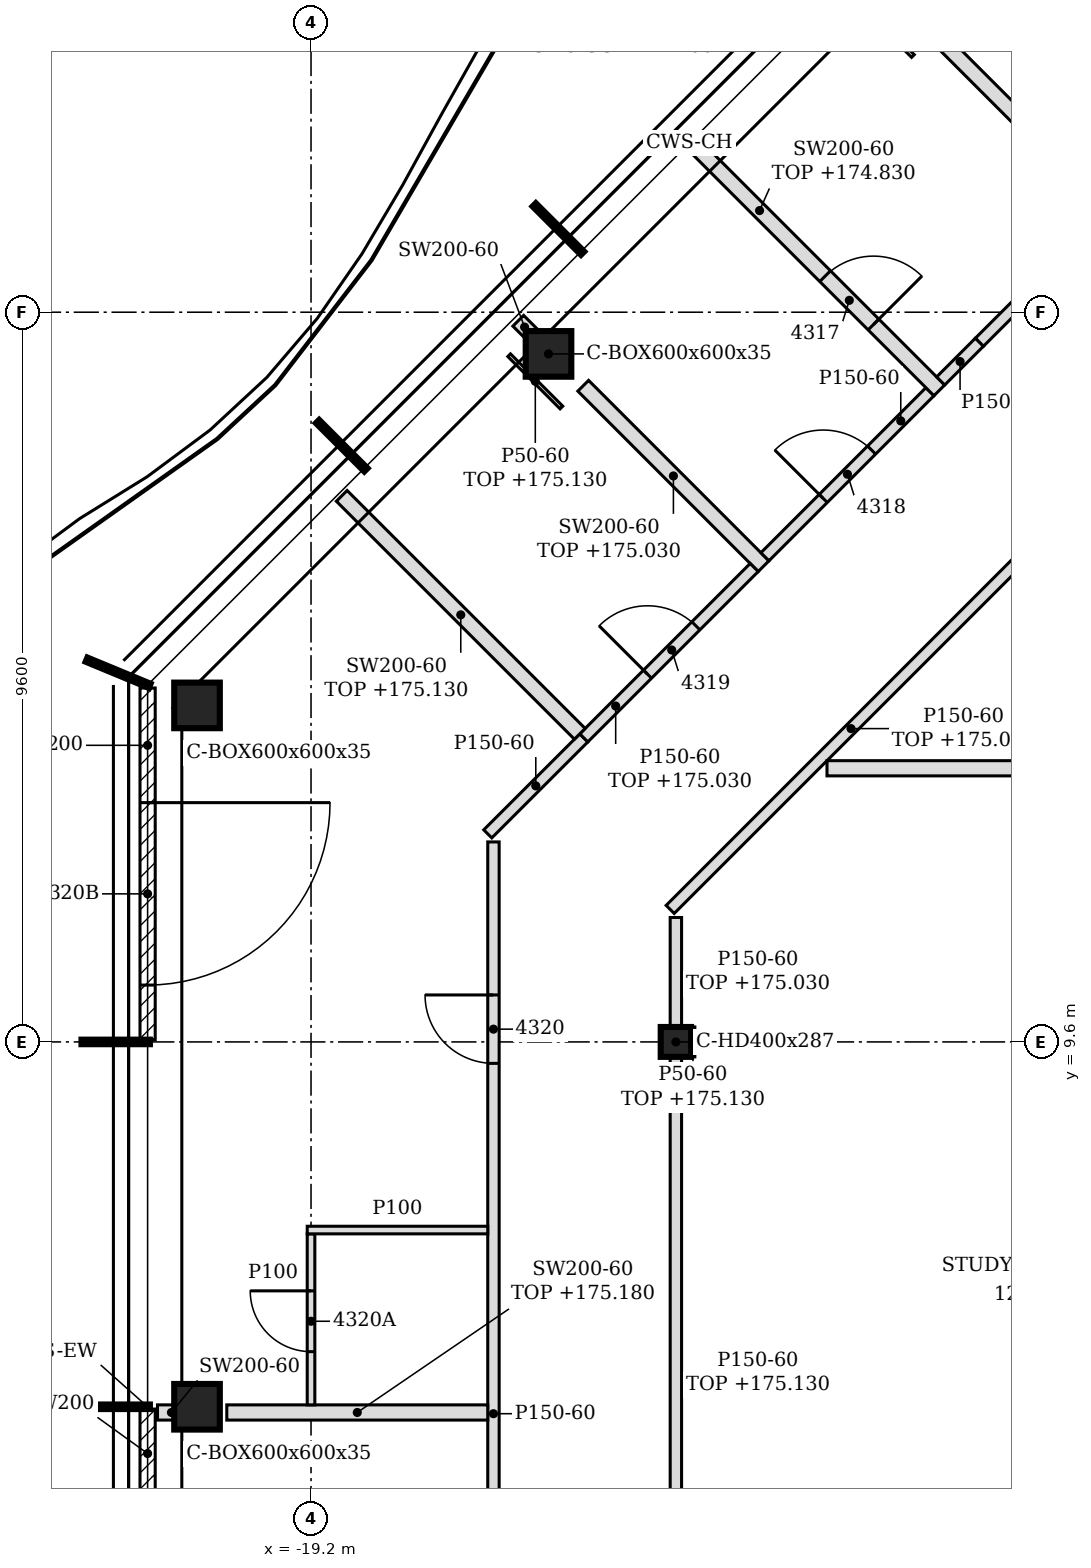
"""IFC4 building model, lengths in metres.
Left out: names, types, materials, properties, quantities, classifications, styles, units other than length and angle.
Written with IfcOpenShell. Run it as: python <this file> out.ifc"""

import sys

from ifc_helpers import new_model, si_unit, direction, frame, frame_2d, origin, origin_2d, place, context, subcontext, project, spatial, polyline, rectangle, hollow_rectangle, i_section, outline, extrude, clip, halfspace, element, fill, save


model = new_model("IFC4")
c1 = context("Model", 3, precision=1e-05, world=origin(), true_north=direction((0.0, 1.0)))
c2 = subcontext(c1, "Body", "Model", "MODEL_VIEW")
j1 = project(units=[si_unit("LENGTHUNIT", "METRE"), si_unit("PLANEANGLEUNIT", "RADIAN")], contexts=[c1])
p1 = place(None, origin())
s1 = spatial("IfcSite", under=j1, at=p1, CompositionType="ELEMENT")
p2 = place(p1, origin())
s2 = spatial("IfcBuilding", under=s1, at=p2, CompositionType="ELEMENT")
p3 = place(p2, frame((0.0, 0.0, 172.2)))
s3 = spatial("IfcBuildingStorey", under=s2, at=p3, CompositionType="ELEMENT", Elevation=172.2)
p4 = place(p3, frame((-16.076, 18.652, -0.15), z_axis=(0.062353782033, -0.041591730966, 0.997187110718), x_axis=(0.554908399644, 0.831911454426, 0.0)))
e1 = element("IfcColumn", 1, at=p4, inside=s3, PredefinedType="COLUMN", context=c2, shape_type="Clipping", body=[
    clip(clip(extrude(hollow_rectangle(XDim=0.6, YDim=0.6, WallThickness=0.035, at=origin_2d()), origin(), (0.0, 0.0, 1.0), 3.61), halfspace(frame((0.0, 0.0, 0.011), z_axis=(0.0, 0.0, 1.0), x_axis=(1.0, 0.0, 0.0)), True)), halfspace(frame((0.0, 0.0, 3.588), z_axis=(0.0, 0.0, 1.0), x_axis=(1.0, 0.0, 0.0)), False)),
])
p5 = place(p3, frame((-20.7, 14.027, -0.15), z_axis=(0.062286590776, -0.041524393851, 0.99719411617), x_axis=(0.554700196225, 0.832050294338, 0.0)))
e2 = element("IfcColumn", 2, at=p5, inside=s3, PredefinedType="COLUMN", context=c2, shape_type="Clipping", body=[
    clip(clip(extrude(hollow_rectangle(XDim=0.6, YDim=0.6, WallThickness=0.035, at=origin_2d()), origin(), (0.0, 0.0, 1.0), 3.61), halfspace(frame((0.0, 0.0, 0.011), z_axis=(0.0, 0.0, 1.0), x_axis=(1.0, 0.0, 0.0)), True)), halfspace(frame((0.0, 0.0, 3.588), z_axis=(0.0, 0.0, 1.0), x_axis=(1.0, 0.0, 0.0)), False)),
])
p6 = place(p3, frame((-20.7, 4.8, -0.15), z_axis=(0.062286415717, -0.041591906261, 0.997191313515), x_axis=(0.555325171193, 0.831633305153, 0.0)))
e3 = element("IfcColumn", 3, at=p6, inside=s3, PredefinedType="COLUMN", context=c2, shape_type="Clipping", body=[
    clip(clip(extrude(hollow_rectangle(XDim=0.6, YDim=0.6, WallThickness=0.035, at=origin_2d()), origin(), (0.0, 0.0, 1.0), 3.61), halfspace(frame((0.0, 0.0, 0.011), z_axis=(0.0, 0.0, 1.0), x_axis=(1.0, 0.0, 0.0)), True)), halfspace(frame((0.0, 0.0, 3.588), z_axis=(0.0, 0.0, 1.0), x_axis=(1.0, 0.0, 0.0)), False)),
])
p7 = place(p3, frame((-14.4, 9.6, -0.15), z_axis=(0.0, 0.0, 1.0), x_axis=(1.0, 0.0, 0.0)))
e4 = element("IfcColumn", 4, at=p7, inside=s3, PredefinedType="COLUMN", context=c2, shape_type="SweptSolid", body=[
    extrude(i_section(OverallWidth=0.399, OverallDepth=0.393, WebThickness=0.023, FlangeThickness=0.037, FilletRadius=0.015, at=origin_2d()), origin(), (0.0, 0.0, 1.0), 3.6),
])
p8 = place(p3, frame((-21.35, 14.256, 0.0), z_axis=(0.0, 0.0, 1.0), x_axis=(0.0, -1.0, 0.0)))
e5 = element("IfcWall", 5, at=p8, inside=s3, PredefinedType="NOTDEFINED", context=c2, shape_type="SweptSolid", body=[
    extrude(rectangle(XDim=4.626, YDim=0.2, at=frame_2d((2.313, 0.0))), origin(), (0.0, 0.0, 1.0), 3.45),
])
p9 = place(p8, frame((1.509, 0.0, 0.0)))
e6 = element("IfcOpeningElement", 6, at=p9, cuts=e5, PredefinedType="OPENING", context=c2, shape_type="SweptSolid", body=[
    extrude(rectangle(XDim=2.4, YDim=2.4, at=frame_2d((1.2, 1.2))), frame((0.0, 0.11, 0.0), z_axis=(0.0, -1.0, 0.0), x_axis=(1.0, 0.0, 0.0)), (0.0, 0.0, 1.0), 0.22),
])
p10 = place(p3, frame((-21.35, 4.77, 0.0), z_axis=(0.0, 0.0, 1.0), x_axis=(0.0, -1.0, 0.0)))
e7 = element("IfcWall", 7, at=p10, inside=s3, PredefinedType="NOTDEFINED", context=c2, shape_type="SweptSolid", body=[
    extrude(rectangle(XDim=4.74, YDim=0.2, at=frame_2d((2.37, 0.0))), origin(), (0.0, 0.0, 1.0), 3.45),
])
p11 = place(p10, frame((1.17, 0.0, 0.0)))
e8 = element("IfcOpeningElement", 8, at=p11, cuts=e7, PredefinedType="OPENING", context=c2, shape_type="SweptSolid", body=[
    extrude(rectangle(XDim=2.4, YDim=2.4, at=frame_2d((1.2, 1.2))), frame((0.0, 0.11, 0.0), z_axis=(0.0, -1.0, 0.0), x_axis=(1.0, 0.0, 0.0)), (0.0, 0.0, 1.0), 0.22),
])
p12 = place(p3, frame((-16.8, 0.1, 0.0), z_axis=(0.0, 0.0, 1.0), x_axis=(0.0, 1.0, 0.0)))
e9 = element("IfcWall", 9, at=p12, inside=s3, PredefinedType="PARTITIONING", context=c2, shape_type="SweptSolid", body=[
    extrude(outline(polyline([(0.0, 0.0), (12.131, 0.0), (12.131, 3.45), (9.445, 3.45), (9.443, 2.98), (9.255, 2.98), (9.253, 3.45), (4.645, 3.45), (4.643, 2.98), (4.455, 2.98), (4.453, 3.45), (0.0, 3.45), (0.0, 0.0)])), frame((0.0, 0.075, 0.0), z_axis=(0.0, -1.0, 0.0), x_axis=(1.0, 0.0, 0.0)), (0.0, 0.0, 1.0), 0.15),
])
p13 = place(p12, frame((9.218, 0.0, 0.0)))
e10 = element("IfcOpeningElement", 10, at=p13, cuts=e9, PredefinedType="OPENING", context=c2, shape_type="SweptSolid", body=[
    extrude(rectangle(XDim=0.9, YDim=2.1, at=frame_2d((0.45, 1.05))), frame((0.0, 0.085, 0.0), z_axis=(0.0, -1.0, 0.0), x_axis=(1.0, 0.0, 0.0)), (0.0, 0.0, 1.0), 0.17),
])
p14 = place(p3, frame((-14.4, 1.094, 0.0), z_axis=(0.0, 0.0, 1.0), x_axis=(0.0, 1.0, 0.0)))
e11 = element("IfcWall", 11, at=p14, inside=s3, PredefinedType="PARTITIONING", context=c2, shape_type="SweptSolid", body=[
    extrude(rectangle(XDim=8.31, YDim=0.15, at=frame_2d((4.155, 0.0))), origin(), (0.0, 0.0, 1.0), 2.93),
])
p15 = place(p3, frame((-21.22, 4.725, 0.0), z_axis=(0.0, 0.0, 1.0), x_axis=(1.0, 0.0, 0.0)))
e12 = element("IfcWall", 12, at=p15, inside=s3, PredefinedType="PARTITIONING", context=c2, shape_type="SweptSolid", body=[
    extrude(outline(polyline([(0.0, 0.0), (0.113, 0.0), (0.167, 0.863), (0.22, 1.725), (0.289, 2.588), (0.367, 3.45), (0.0, 3.45), (0.0, 2.588), (0.0, 1.725), (0.0, 0.863), (0.0, 0.0)])), frame((0.0, 0.1, 0.0), z_axis=(0.0, -1.0, 0.0), x_axis=(1.0, 0.0, 0.0)), (0.0, 0.0, 1.0), 0.2),
])
p16 = place(p3, frame((-20.308, 4.725, 0.0), z_axis=(0.0, 0.0, 1.0), x_axis=(1.0, 0.0, 0.0)))
e13 = element("IfcWall", 13, at=p16, inside=s3, PredefinedType="PARTITIONING", context=c2, shape_type="SweptSolid", body=[
    extrude(outline(polyline([(0.0, 0.0), (3.433, 0.0), (3.433, 0.863), (3.433, 1.725), (3.433, 2.588), (3.433, 2.98), (0.221, 2.98), (0.196, 2.588), (0.142, 1.725), (0.078, 0.863), (0.0, 0.0)])), frame((0.0, 0.1, 0.0), z_axis=(0.0, -1.0, 0.0), x_axis=(1.0, 0.0, 0.0)), (0.0, 0.0, 1.0), 0.2),
])
p17 = place(p3, frame((-19.2, 4.825, 0.0), z_axis=(0.0, 0.0, 1.0), x_axis=(0.0, 1.0, 0.0)))
e14 = element("IfcWall", 14, at=p17, inside=s3, PredefinedType="PARTITIONING", context=c2, shape_type="SweptSolid", body=[
    extrude(rectangle(XDim=2.25, YDim=0.1, at=frame_2d((1.125, 0.0))), origin(), (0.0, 0.0, 1.0), 3.45),
])
p18 = place(p17, frame((0.7, 0.0, 0.0)))
e15 = element("IfcOpeningElement", 15, at=p18, cuts=e14, PredefinedType="OPENING", context=c2, shape_type="SweptSolid", body=[
    extrude(rectangle(XDim=0.8, YDim=2.1, at=frame_2d((0.4, 1.05))), frame((0.0, 0.06, 0.0), z_axis=(0.0, -1.0, 0.0), x_axis=(1.0, 0.0, 0.0)), (0.0, 0.0, 1.0), 0.12),
])
p19 = place(p3, frame((-19.25, 7.125, 0.0), z_axis=(0.0, 0.0, 1.0), x_axis=(1.0, 0.0, 0.0)))
e16 = element("IfcWall", 16, at=p19, inside=s3, PredefinedType="PARTITIONING", context=c2, shape_type="SweptSolid", body=[
    extrude(rectangle(XDim=2.375, YDim=0.1, at=frame_2d((1.188, 0.0))), origin(), (0.0, 0.0, 1.0), 3.45),
])
p20 = place(p3, frame((-14.4, 9.796, 0.0), z_axis=(0.0, 0.0, 1.0), x_axis=(0.0, 1.0, 0.0)))
e17 = element("IfcWall", 17, at=p20, inside=s3, PredefinedType="PARTITIONING", context=c2, shape_type="SweptSolid", body=[
    extrude(rectangle(XDim=1.44, YDim=0.15, at=frame_2d((0.72, 0.0))), origin(), (0.0, 0.0, 1.0), 2.83),
])
p21 = place(p3, frame((-14.475, 11.343, 0.0), z_axis=(0.0, 0.0, 1.0), x_axis=(0.707124921665, 0.707088640243, 0.0)))
e18 = element("IfcWall", 18, at=p21, inside=s3, PredefinedType="PARTITIONING", context=c2, shape_type="SweptSolid", body=[
    extrude(rectangle(XDim=6.729, YDim=0.15, at=frame_2d((3.365, 0.0))), origin(), (0.0, 0.0, 1.0), 2.83),
])
p22 = place(p3, frame((-16.875, 12.337, 0.0), z_axis=(0.0, 0.0, 1.0), x_axis=(0.707380006342, 0.706833450417, 0.0)))
e19 = element("IfcWall", 19, at=p22, inside=s3, PredefinedType="PARTITIONING", context=c2, shape_type="SweptSolid", body=[
    extrude(rectangle(XDim=1.787, YDim=0.15, at=frame_2d((0.894, 0.0))), origin(), (0.0, 0.0, 1.0), 3.45),
])
p23 = place(p3, frame((-12.412, 13.2, 0.0), z_axis=(0.0, 0.0, 1.0), x_axis=(1.0, 0.0, 0.0)))
e20 = element("IfcWall", 20, at=p23, inside=s3, PredefinedType="PARTITIONING", context=c2, shape_type="SweptSolid", body=[
    extrude(rectangle(XDim=5.285, YDim=0.2, at=frame_2d((2.643, 0.0))), origin(), (0.0, 0.0, 1.0), 3.45),
])
p24 = place(p3, frame((-15.611, 13.6, 0.0), z_axis=(0.0, 0.0, 1.0), x_axis=(0.707145291481, 0.707068268794, 0.0)))
e21 = element("IfcWall", 21, at=p24, inside=s3, PredefinedType="PARTITIONING", context=c2, shape_type="SweptSolid", body=[
    extrude(rectangle(XDim=3.17, YDim=0.15, at=frame_2d((1.585, 0.0))), origin(), (0.0, 0.0, 1.0), 2.83),
])
p25 = place(p24, frame((1.185, 0.0, 0.0)))
e22 = element("IfcOpeningElement", 22, at=p25, cuts=e21, PredefinedType="OPENING", context=c2, shape_type="SweptSolid", body=[
    extrude(rectangle(XDim=0.9, YDim=2.1, at=frame_2d((0.45, 1.05))), frame((0.0, 0.085, 0.0), z_axis=(0.0, -1.0, 0.0), x_axis=(1.0, 0.0, 0.0)), (0.0, 0.0, 1.0), 0.17),
])
p26 = place(p3, frame((-15.664, 13.653, 0.0), z_axis=(0.0, 0.0, 1.0), x_axis=(-0.707217034054, 0.706996511125, 0.0)))
e23 = element("IfcWall", 23, at=p26, inside=s3, PredefinedType="PARTITIONING", context=c2, shape_type="SweptSolid", body=[
    extrude(rectangle(XDim=4.428, YDim=0.2, at=frame_2d((2.214, 0.0))), origin(), (0.0, 0.0, 1.0), 2.93),
])
p27 = place(p3, frame((-13.246, 15.859, 0.0), z_axis=(0.0, 0.0, 1.0), x_axis=(-0.706961285969, 0.707252246473, 0.0)))
e24 = element("IfcWall", 24, at=p27, inside=s3, PredefinedType="PARTITIONING", context=c2, shape_type="SweptSolid", body=[
    extrude(rectangle(XDim=3.356, YDim=0.2, at=frame_2d((1.678, 0.0))), origin(), (0.0, 0.0, 1.0), 2.83),
])
p28 = place(p3, frame((-13.228, 15.983, 0.0), z_axis=(0.0, 0.0, 1.0), x_axis=(0.706947737832, 0.707265788777, 0.0)))
e25 = element("IfcWall", 25, at=p28, inside=s3, PredefinedType="PARTITIONING", context=c2, shape_type="SweptSolid", body=[
    extrude(rectangle(XDim=3.071, YDim=0.15, at=frame_2d((1.535, 0.0))), origin(), (0.0, 0.0, 1.0), 3.45),
])
p29 = place(p28, frame((1.085, 0.0, 0.0)))
e26 = element("IfcOpeningElement", 26, at=p29, cuts=e25, PredefinedType="OPENING", context=c2, shape_type="SweptSolid", body=[
    extrude(rectangle(XDim=0.9, YDim=2.1, at=frame_2d((0.45, 1.05))), frame((0.0, 0.085, 0.0), z_axis=(0.0, -1.0, 0.0), x_axis=(1.0, 0.0, 0.0)), (0.0, 0.0, 1.0), 0.17),
])
p30 = place(p3, frame((-10.934, 18.172, 0.0), z_axis=(0.0, 0.0, 1.0), x_axis=(-0.707106781187, 0.707106781187, 0.0)))
e27 = element("IfcWall", 27, at=p30, inside=s3, PredefinedType="PARTITIONING", context=c2, shape_type="SweptSolid", body=[
    extrude(rectangle(XDim=4.565, YDim=0.2, at=frame_2d((2.282, 0.0))), origin(), (0.0, 0.0, 1.0), 2.63),
])
p31 = place(p30, frame((1.225, 0.0, 0.0)))
e28 = element("IfcOpeningElement", 28, at=p31, cuts=e27, PredefinedType="OPENING", context=c2, shape_type="SweptSolid", body=[
    extrude(rectangle(XDim=0.9, YDim=2.1, at=frame_2d((0.45, 1.05))), frame((0.0, 0.11, 0.0), z_axis=(0.0, -1.0, 0.0), x_axis=(1.0, 0.0, 0.0)), (0.0, 0.0, 1.0), 0.22),
])
p32 = place(p3, frame((-10.916, 18.296, 0.0), z_axis=(0.0, 0.0, 1.0), x_axis=(0.707106781187, 0.707106781187, 0.0)))
e29 = element("IfcWall", 29, at=p32, inside=s3, PredefinedType="PARTITIONING", context=c2, shape_type="SweptSolid", body=[
    extrude(rectangle(XDim=0.722, YDim=0.15, at=frame_2d((0.361, 0.0))), origin(), (0.0, 0.0, 1.0), 3.45),
])
p33 = place(p3, frame((-10.406, 18.806, 0.0), z_axis=(0.0, 0.0, 1.0), x_axis=(0.707408152147, 0.706805281726, 0.0)))
e30 = element("IfcWall", 30, at=p33, inside=s3, PredefinedType="PARTITIONING", context=c2, shape_type="SweptSolid", body=[
    extrude(rectangle(XDim=2.025, YDim=0.15, at=frame_2d((1.012, 0.0))), origin(), (0.0, 0.0, 1.0), 2.93),
])
p34 = place(p3, frame((-16.307, 18.921, 0.0), z_axis=(0.0, 0.0, 1.0), x_axis=(-0.707623860892, 0.706589323084, 0.0)))
e31 = element("IfcWall", 31, at=p34, inside=s3, PredefinedType="PARTITIONING", context=c2, shape_type="SweptSolid", body=[
    extrude(rectangle(XDim=0.236, YDim=0.2, at=frame_2d((0.118, 0.0))), origin(), (0.0, 0.0, 1.0), 3.45),
])
p35 = place(p3, frame((-8.622, 20.484, 0.0), z_axis=(0.0, 0.0, 1.0), x_axis=(-0.707070404574, 0.707143155928, 0.0)))
e32 = element("IfcWall", 32, at=p35, inside=s3, PredefinedType="PARTITIONING", context=c2, shape_type="SweptSolid", body=[
    extrude(rectangle(XDim=3.356, YDim=0.2, at=frame_2d((1.678, 0.0))), origin(), (0.0, 0.0, 1.0), 3.45),
])
p36 = place(p3, frame((-14.176, 9.404, 0.0), z_axis=(0.0, 0.0, 1.0), x_axis=(0.0, 1.0, 0.0)))
e33 = element("IfcWall", 33, at=p36, inside=s3, PredefinedType="PARTITIONING", context=c2, shape_type="SweptSolid", body=[
    extrude(rectangle(XDim=0.393, YDim=0.05, at=frame_2d((0.196, 0.0))), origin(), (0.0, 0.0, 1.0), 2.93),
])
p37 = place(p3, frame((-15.906, 17.946, 0.0), z_axis=(0.0, 0.0, 1.0), x_axis=(-0.706981329796, 0.707232210324, 0.0)))
e34 = element("IfcWall", 34, at=p37, inside=s3, PredefinedType="PARTITIONING", context=c2, shape_type="SweptSolid", body=[
    extrude(rectangle(XDim=0.973, YDim=0.05, at=frame_2d((0.487, 0.0))), origin(), (0.0, 0.0, 1.0), 2.93),
])
p38 = place(p3, frame((-11.281, 22.571, 0.0), z_axis=(0.0, 0.0, 1.0), x_axis=(-0.706981285266, 0.707232254838, 0.0)))
e35 = element("IfcWall", 35, at=p38, inside=s3, PredefinedType="PARTITIONING", context=c2, shape_type="SweptSolid", body=[
    extrude(rectangle(XDim=0.973, YDim=0.05, at=frame_2d((0.486, 0.0))), origin(), (0.0, 0.0, 1.0), 2.63),
])
p39 = place(p9, origin())
e36 = element("IfcDoor", 36, at=p39, inside=s3, OperationType="SINGLE_SWING_LEFT", PredefinedType="DOOR", context=c2, shape_type="SweptSolid", body=[
    extrude(rectangle(XDim=2.4, YDim=2.4, at=frame_2d((1.2, 1.2))), frame((0.0, 0.025, 0.0), z_axis=(0.0, -1.0, 0.0), x_axis=(1.0, 0.0, 0.0)), (0.0, 0.0, 1.0), 0.05),
])
fill(e6, e36)
p40 = place(p31, frame((0.9, 0.0, 0.0), z_axis=(0.0, 0.0, 1.0), x_axis=(-1.0, 0.0, 0.0)))
e37 = element("IfcDoor", 37, at=p40, inside=s3, OperationType="SINGLE_SWING_RIGHT", PredefinedType="DOOR", context=c2, shape_type="SweptSolid", body=[
    extrude(rectangle(XDim=0.9, YDim=2.1, at=frame_2d((0.45, 1.05))), frame((0.0, 0.025, 0.0), z_axis=(0.0, -1.0, 0.0), x_axis=(1.0, 0.0, 0.0)), (0.0, 0.0, 1.0), 0.05),
])
fill(e28, e37)
p41 = place(p29, origin())
e38 = element("IfcDoor", 38, at=p41, inside=s3, OperationType="SINGLE_SWING_LEFT", PredefinedType="DOOR", context=c2, shape_type="SweptSolid", body=[
    extrude(rectangle(XDim=0.9, YDim=2.1, at=frame_2d((0.45, 1.05))), frame((0.0, 0.025, 0.0), z_axis=(0.0, -1.0, 0.0), x_axis=(1.0, 0.0, 0.0)), (0.0, 0.0, 1.0), 0.05),
])
fill(e26, e38)
p42 = place(p25, origin())
e39 = element("IfcDoor", 39, at=p42, inside=s3, OperationType="SINGLE_SWING_LEFT", PredefinedType="DOOR", context=c2, shape_type="SweptSolid", body=[
    extrude(rectangle(XDim=0.9, YDim=2.1, at=frame_2d((0.45, 1.05))), frame((0.0, 0.025, 0.0), z_axis=(0.0, -1.0, 0.0), x_axis=(1.0, 0.0, 0.0)), (0.0, 0.0, 1.0), 0.05),
])
fill(e22, e39)
p43 = place(p13, origin())
e40 = element("IfcDoor", 40, at=p43, inside=s3, OperationType="SINGLE_SWING_RIGHT", PredefinedType="DOOR", context=c2, shape_type="SweptSolid", body=[
    extrude(rectangle(XDim=0.9, YDim=2.1, at=frame_2d((0.45, 1.05))), frame((0.0, 0.025, 0.0), z_axis=(0.0, -1.0, 0.0), x_axis=(1.0, 0.0, 0.0)), (0.0, 0.0, 1.0), 0.05),
])
fill(e10, e40)
p44 = place(p18, origin())
e41 = element("IfcDoor", 41, at=p44, inside=s3, OperationType="SINGLE_SWING_RIGHT", PredefinedType="DOOR", context=c2, shape_type="SweptSolid", body=[
    extrude(rectangle(XDim=0.8, YDim=2.1, at=frame_2d((0.4, 1.05))), frame((0.0, 0.025, 0.0), z_axis=(0.0, -1.0, 0.0), x_axis=(1.0, 0.0, 0.0)), (0.0, 0.0, 1.0), 0.05),
])
fill(e15, e41)
save(model, sys.argv[1])
